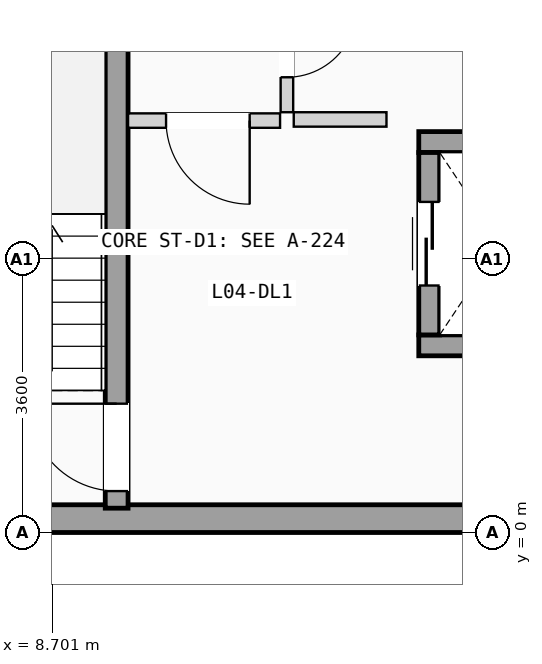
"""IFC4 building model, lengths in metres.
Left out: names, types, materials, properties, quantities, classifications, styles, units other than length and angle.
Written with IfcOpenShell. Run it as: python <this file> out.ifc"""

import sys

from ifc_helpers import new_model, si_unit, direction, frame, frame_2d, origin, place, context, subcontext, project, spatial, rectangle, extrude, element, fill, save


model = new_model("IFC4")
c1 = context("Model", 3, precision=1e-05, world=origin(), true_north=direction((0.0, 1.0)))
c2 = subcontext(c1, "Body", "Model", "MODEL_VIEW")
j1 = project(units=[si_unit("LENGTHUNIT", "METRE"), si_unit("PLANEANGLEUNIT", "RADIAN")], contexts=[c1])
p1 = place(None, origin())
s1 = spatial("IfcSite", under=j1, at=p1, CompositionType="ELEMENT")
p2 = place(p1, origin())
s2 = spatial("IfcBuilding", under=s1, at=p2, CompositionType="ELEMENT")
p3 = place(p2, frame((0.0, 0.0, 15.225)))
s3 = spatial("IfcBuildingStorey", under=s2, at=p3, CompositionType="ELEMENT", Elevation=15.225)
p4 = place(p3, frame((0.0, 0.183, 0.0), z_axis=(0.0, 0.0, 1.0), x_axis=(1.0, 0.0, 0.0)))
e1 = element("IfcWall", 1, at=p4, inside=s3, PredefinedType="SOLIDWALL", context=c2, shape_type="SweptSolid", body=[
    extrude(rectangle(XDim=21.6, YDim=0.365, at=frame_2d((10.8, 0.0))), origin(), (0.0, 0.0, 1.0), 2.89),
])
p5 = place(p3, frame((9.55, 0.32, 0.0), z_axis=(0.0, 0.0, 1.0), x_axis=(0.0, 1.0, 0.0)))
e2 = element("IfcWall", 2, at=p5, inside=s3, PredefinedType="SHEAR", context=c2, shape_type="SweptSolid", body=[
    extrude(rectangle(XDim=7.0, YDim=0.3, at=frame_2d((3.5, 0.0))), origin(), (0.0, 0.0, 1.0), 2.89),
])
p6 = place(p5, frame((0.225, 0.0, 0.0)))
e3 = element("IfcOpeningElement", 3, at=p6, cuts=e2, PredefinedType="OPENING", context=c2, shape_type="SweptSolid", body=[
    extrude(rectangle(XDim=1.15, YDim=2.12, at=frame_2d((0.575, 1.06))), frame((0.0, 0.16, 0.0), z_axis=(0.0, -1.0, 0.0), x_axis=(1.0, 0.0, 0.0)), (0.0, 0.0, 1.0), 0.32),
])
for number, where, z_axis, x_axis in (
    (4, (13.525, 2.462, 0.0), (0.0, 0.0, 1.0), (1.0, 0.0, 0.0)),
    (5, (13.525, 5.137, 0.0), (0.0, 0.0, 1.0), (1.0, 0.0, 0.0)),
):
    element("IfcWall", number, at=place(p3, frame(where, z_axis=z_axis, x_axis=x_axis)), inside=s3, PredefinedType="SHEAR", context=c2, shape_type="SweptSolid", body=[
        extrude(rectangle(XDim=2.15, YDim=0.275, at=frame_2d((1.075, 0.0))), origin(), (0.0, 0.0, 1.0), 2.89),
    ])
p7 = place(p3, frame((13.663, 2.6, 0.0), z_axis=(0.0, 0.0, 1.0), x_axis=(0.0, 1.0, 0.0)))
e6 = element("IfcWall", 6, at=p7, inside=s3, PredefinedType="SHEAR", context=c2, shape_type="SweptSolid", body=[
    extrude(rectangle(XDim=2.4, YDim=0.275, at=frame_2d((1.2, 0.0))), origin(), (0.0, 0.0, 1.0), 2.89),
])
p8 = place(p7, frame((0.65, 0.0, 0.0)))
e7 = element("IfcOpeningElement", 7, at=p8, cuts=e6, PredefinedType="OPENING", context=c2, shape_type="SweptSolid", body=[
    extrude(rectangle(XDim=1.1, YDim=2.15, at=frame_2d((0.55, 1.075))), frame((0.0, 0.147, 0.0), z_axis=(0.0, -1.0, 0.0), x_axis=(1.0, 0.0, 0.0)), (0.0, 0.0, 1.0), 0.295),
])
p9 = place(p3, frame((11.88, 5.435, 0.0), z_axis=(0.0, 0.0, 1.0), x_axis=(1.0, 0.0, 0.0)))
e8 = element("IfcWall", 8, at=p9, inside=s3, PredefinedType="PARTITIONING", context=c2, shape_type="SweptSolid", body=[
    extrude(rectangle(XDim=1.22, YDim=0.19, at=frame_2d((0.61, 0.0))), origin(), (0.0, 0.0, 1.0), 2.87),
])
p10 = place(p3, frame((9.7, 5.42, 0.0), z_axis=(0.0, 0.0, 1.0), x_axis=(1.0, 0.0, 0.0)))
e9 = element("IfcWall", 9, at=p10, inside=s3, PredefinedType="PARTITIONING", context=c2, shape_type="SweptSolid", body=[
    extrude(rectangle(XDim=2.0, YDim=0.19, at=frame_2d((1.0, 0.0))), origin(), (0.0, 0.0, 1.0), 2.87),
])
p11 = place(p10, frame((0.5, 0.0, 0.0)))
e10 = element("IfcOpeningElement", 10, at=p11, cuts=e9, PredefinedType="OPENING", context=c2, shape_type="SweptSolid", body=[
    extrude(rectangle(XDim=1.1, YDim=2.12, at=frame_2d((0.55, 1.06))), frame((0.0, 0.105, 0.0), z_axis=(0.0, -1.0, 0.0), x_axis=(1.0, 0.0, 0.0)), (0.0, 0.0, 1.0), 0.21),
])
p12 = place(p3, frame((11.79, 5.53, 0.0), z_axis=(0.0, 0.0, 1.0), x_axis=(0.0, 1.0, 0.0)))
e11 = element("IfcWall", 11, at=p12, inside=s3, PredefinedType="PARTITIONING", context=c2, shape_type="SweptSolid", body=[
    extrude(rectangle(XDim=1.82, YDim=0.165, at=frame_2d((0.91, 0.0))), origin(), (0.0, 0.0, 1.0), 2.87),
])
p13 = place(p12, frame((0.46, 0.0, 0.0)))
e12 = element("IfcOpeningElement", 12, at=p13, cuts=e11, PredefinedType="OPENING", context=c2, shape_type="SweptSolid", body=[
    extrude(rectangle(XDim=0.92, YDim=2.04, at=frame_2d((0.46, 1.02))), frame((0.0, 0.093, 0.0), z_axis=(0.0, -1.0, 0.0), x_axis=(1.0, 0.0, 0.0)), (0.0, 0.0, 1.0), 0.185),
])
p14 = place(p6, origin())
e13 = element("IfcDoor", 13, at=p14, inside=s3, OperationType="SINGLE_SWING_RIGHT", PredefinedType="DOOR", context=c2, shape_type="SweptSolid", body=[
    extrude(rectangle(XDim=1.15, YDim=2.12, at=frame_2d((0.575, 1.06))), frame((0.0, 0.025, 0.0), z_axis=(0.0, -1.0, 0.0), x_axis=(1.0, 0.0, 0.0)), (0.0, 0.0, 1.0), 0.05),
])
fill(e3, e13)
p15 = place(p8, origin())
e14 = element("IfcDoor", 14, at=p15, inside=s3, OperationType="SLIDING_TO_LEFT", PredefinedType="DOOR", context=c2, shape_type="SweptSolid", body=[
    extrude(rectangle(XDim=1.1, YDim=2.15, at=frame_2d((0.55, 1.075))), frame((0.0, 0.025, 0.0), z_axis=(0.0, -1.0, 0.0), x_axis=(1.0, 0.0, 0.0)), (0.0, 0.0, 1.0), 0.05),
])
fill(e7, e14)
p16 = place(p11, frame((1.1, 0.0, 0.0), z_axis=(0.0, 0.0, 1.0), x_axis=(-1.0, 0.0, 0.0)))
e15 = element("IfcDoor", 15, at=p16, inside=s3, OperationType="SINGLE_SWING_RIGHT", PredefinedType="DOOR", context=c2, shape_type="SweptSolid", body=[
    extrude(rectangle(XDim=1.1, YDim=2.12, at=frame_2d((0.55, 1.06))), frame((0.0, 0.025, 0.0), z_axis=(0.0, -1.0, 0.0), x_axis=(1.0, 0.0, 0.0)), (0.0, 0.0, 1.0), 0.05),
])
fill(e10, e15)
p17 = place(p13, frame((0.92, 0.0, 0.0), z_axis=(0.0, 0.0, 1.0), x_axis=(-1.0, 0.0, 0.0)))
e16 = element("IfcDoor", 16, at=p17, inside=s3, OperationType="SINGLE_SWING_RIGHT", PredefinedType="DOOR", context=c2, shape_type="SweptSolid", body=[
    extrude(rectangle(XDim=0.92, YDim=2.04, at=frame_2d((0.46, 1.02))), frame((0.0, 0.025, 0.0), z_axis=(0.0, -1.0, 0.0), x_axis=(1.0, 0.0, 0.0)), (0.0, 0.0, 1.0), 0.05),
])
fill(e12, e16)
save(model, sys.argv[1])
